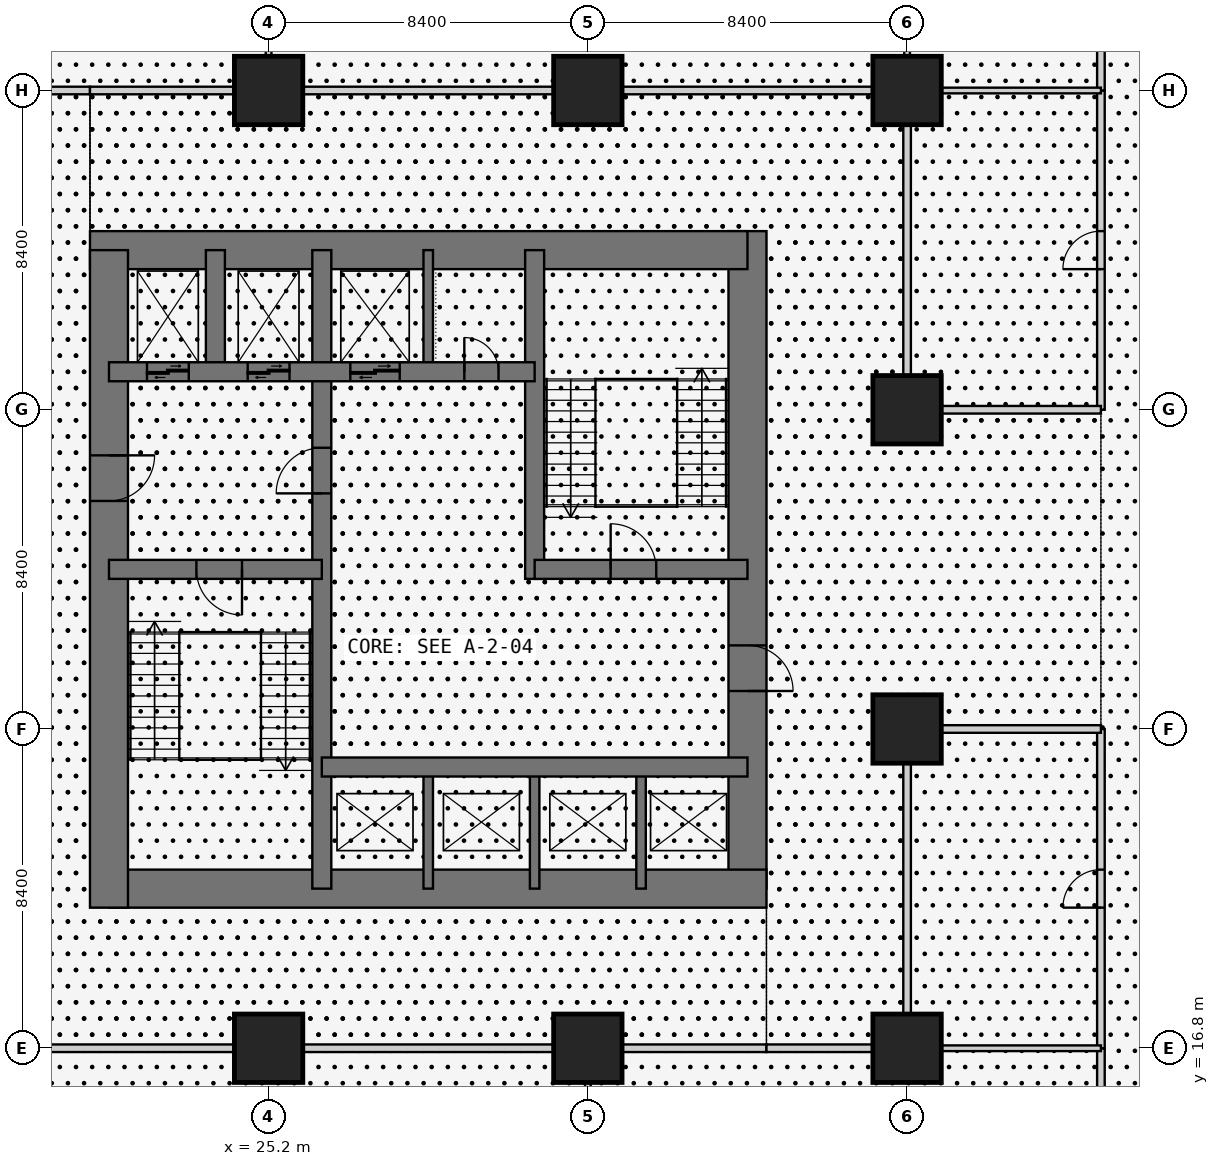
"""IFC4 building model, lengths in metres.
Left out: names, types, materials, properties, quantities, classifications, styles, units other than length and angle.
Written with IfcOpenShell. Run it as: python <this file> out.ifc"""

import sys

from ifc_helpers import new_model, si_unit, direction, frame, frame_2d, origin, origin_2d, place, context, subcontext, project, spatial, rectangle, extrude, element, fill, save


model = new_model("IFC4")
c1 = context("Model", 3, precision=1e-05, world=origin(), true_north=direction((0.0, 1.0)))
c2 = subcontext(c1, "Body", "Model", "MODEL_VIEW")
j1 = project(units=[si_unit("LENGTHUNIT", "METRE"), si_unit("PLANEANGLEUNIT", "RADIAN")], contexts=[c1])
p1 = place(None, origin())
s1 = spatial("IfcSite", under=j1, at=p1, CompositionType="ELEMENT")
p2 = place(p1, origin())
s2 = spatial("IfcBuilding", under=s1, at=p2, CompositionType="ELEMENT")
p3 = place(p2, frame((0.0, 0.0, 6.0)))
s3 = spatial("IfcBuildingStorey", under=s2, at=p3, CompositionType="ELEMENT", Elevation=6.0)
for number, where, z_axis, x_axis in (
    (1, (25.2, 16.8, 0.0), (0.0, 0.0, 1.0), (1.0, 0.0, 0.0)),
    (2, (25.2, 42.0, 0.0), (0.0, 0.0, 1.0), (1.0, 0.0, 0.0)),
    (3, (33.6, 16.8, 0.0), (0.0, 0.0, 1.0), (1.0, 0.0, 0.0)),
    (4, (33.6, 42.0, 0.0), (0.0, 0.0, 1.0), (1.0, 0.0, 0.0)),
    (5, (42.0, 16.8, 0.0), (0.0, 0.0, 1.0), (1.0, 0.0, 0.0)),
    (6, (42.0, 25.2, 0.0), (0.0, 0.0, 1.0), (1.0, 0.0, 0.0)),
    (7, (42.0, 33.6, 0.0), (0.0, 0.0, 1.0), (1.0, 0.0, 0.0)),
    (8, (42.0, 42.0, 0.0), (0.0, 0.0, 1.0), (1.0, 0.0, 0.0)),
):
    element("IfcColumn", number, at=place(p3, frame(where, z_axis=z_axis, x_axis=x_axis)), inside=s3, PredefinedType="COLUMN", context=c2, shape_type="SweptSolid", body=[
        extrude(rectangle(XDim=1.8, YDim=1.8, at=origin_2d()), origin(), (0.0, 0.0, 1.0), 4.5),
    ])
p4 = place(p3, frame((21.0, 21.0, 0.0), z_axis=(0.0, 0.0, 1.0), x_axis=(1.0, 0.0, 0.0)))
e9 = element("IfcWall", 9, at=p4, inside=s3, PredefinedType="SHEAR", context=c2, shape_type="SweptSolid", body=[
    extrude(rectangle(XDim=17.3, YDim=1.0, at=frame_2d((8.65, 0.0))), origin(), (0.0, 0.0, 1.0), 4.5),
])
p5 = place(p3, frame((37.8, 21.0, 0.0), z_axis=(0.0, 0.0, 1.0), x_axis=(0.0, 1.0, 0.0)))
e10 = element("IfcWall", 10, at=p5, inside=s3, PredefinedType="SHEAR", context=c2, shape_type="SweptSolid", body=[
    extrude(rectangle(XDim=17.3, YDim=1.0, at=frame_2d((8.65, 0.0))), origin(), (0.0, 0.0, 1.0), 4.5),
])
p6 = place(p5, frame((5.2, 0.0, 0.0)))
e11 = element("IfcOpeningElement", 11, at=p6, cuts=e10, PredefinedType="OPENING", context=c2, shape_type="SweptSolid", body=[
    extrude(rectangle(XDim=1.2, YDim=2.1, at=frame_2d((0.6, 1.05))), frame((0.0, 0.51, 0.0), z_axis=(0.0, -1.0, 0.0), x_axis=(1.0, 0.0, 0.0)), (0.0, 0.0, 1.0), 1.02),
])
p7 = place(p3, frame((37.8, 37.8, 0.0), z_axis=(0.0, 0.0, 1.0), x_axis=(-1.0, 0.0, 0.0)))
e12 = element("IfcWall", 12, at=p7, inside=s3, PredefinedType="SHEAR", context=c2, shape_type="SweptSolid", body=[
    extrude(rectangle(XDim=17.3, YDim=1.0, at=frame_2d((8.65, 0.0))), origin(), (0.0, 0.0, 1.0), 4.5),
])
p8 = place(p3, frame((21.0, 37.8, 0.0), z_axis=(0.0, 0.0, 1.0), x_axis=(0.0, -1.0, 0.0)))
e13 = element("IfcWall", 13, at=p8, inside=s3, PredefinedType="SHEAR", context=c2, shape_type="SweptSolid", body=[
    extrude(rectangle(XDim=17.3, YDim=1.0, at=frame_2d((8.65, 0.0))), origin(), (0.0, 0.0, 1.0), 4.5),
])
p9 = place(p8, frame((5.4, 0.0, 0.0)))
e14 = element("IfcOpeningElement", 14, at=p9, cuts=e13, PredefinedType="OPENING", context=c2, shape_type="SweptSolid", body=[
    extrude(rectangle(XDim=1.2, YDim=2.1, at=frame_2d((0.6, 1.05))), frame((0.0, 0.51, 0.0), z_axis=(0.0, -1.0, 0.0), x_axis=(1.0, 0.0, 0.0)), (0.0, 0.0, 1.0), 1.02),
])
p10 = place(p3, frame((26.6, 21.0, 0.0), z_axis=(0.0, 0.0, 1.0), x_axis=(0.0, 1.0, 0.0)))
e15 = element("IfcWall", 15, at=p10, inside=s3, PredefinedType="SHEAR", context=c2, shape_type="SweptSolid", body=[
    extrude(rectangle(XDim=16.8, YDim=0.5, at=frame_2d((8.4, 0.0))), origin(), (0.0, 0.0, 1.0), 4.5),
])
p11 = place(p10, frame((10.4, 0.0, 0.0)))
e16 = element("IfcOpeningElement", 16, at=p11, cuts=e15, PredefinedType="OPENING", context=c2, shape_type="SweptSolid", body=[
    extrude(rectangle(XDim=1.2, YDim=2.1, at=frame_2d((0.6, 1.05))), frame((0.0, 0.26, 0.0), z_axis=(0.0, -1.0, 0.0), x_axis=(1.0, 0.0, 0.0)), (0.0, 0.0, 1.0), 0.52),
])
p12 = place(p3, frame((21.0, 29.4, 0.0), z_axis=(0.0, 0.0, 1.0), x_axis=(1.0, 0.0, 0.0)))
e17 = element("IfcWall", 17, at=p12, inside=s3, PredefinedType="SHEAR", context=c2, shape_type="SweptSolid", body=[
    extrude(rectangle(XDim=5.6, YDim=0.5, at=frame_2d((2.8, 0.0))), origin(), (0.0, 0.0, 1.0), 4.5),
])
p13 = place(p12, frame((2.3, 0.0, 0.0)))
e18 = element("IfcOpeningElement", 18, at=p13, cuts=e17, PredefinedType="OPENING", context=c2, shape_type="SweptSolid", body=[
    extrude(rectangle(XDim=1.2, YDim=2.1, at=frame_2d((0.6, 1.05))), frame((0.0, 0.26, 0.0), z_axis=(0.0, -1.0, 0.0), x_axis=(1.0, 0.0, 0.0)), (0.0, 0.0, 1.0), 0.52),
])
p14 = place(p3, frame((21.0, 34.6, 0.0), z_axis=(0.0, 0.0, 1.0), x_axis=(1.0, 0.0, 0.0)))
e19 = element("IfcWall", 19, at=p14, inside=s3, PredefinedType="SHEAR", context=c2, shape_type="SweptSolid", body=[
    extrude(rectangle(XDim=11.2, YDim=0.5, at=frame_2d((5.6, 0.0))), origin(), (0.0, 0.0, 1.0), 4.5),
])
p15 = place(p14, frame((9.35, 0.0, 0.0)))
e20 = element("IfcOpeningElement", 20, at=p15, cuts=e19, PredefinedType="OPENING", context=c2, shape_type="SweptSolid", body=[
    extrude(rectangle(XDim=0.9, YDim=2.1, at=frame_2d((0.45, 1.05))), frame((0.0, 0.26, 0.0), z_axis=(0.0, -1.0, 0.0), x_axis=(1.0, 0.0, 0.0)), (0.0, 0.0, 1.0), 0.52),
])
p16 = place(p14, frame((1.0, 0.0, 0.0)))
e21 = element("IfcOpeningElement", 21, at=p16, cuts=e19, PredefinedType="OPENING", context=c2, shape_type="SweptSolid", body=[
    extrude(rectangle(XDim=1.1, YDim=2.1, at=frame_2d((0.55, 1.05))), frame((0.0, 0.26, 0.0), z_axis=(0.0, -1.0, 0.0), x_axis=(1.0, 0.0, 0.0)), (0.0, 0.0, 1.0), 0.52),
])
p17 = place(p14, frame((3.65, 0.0, 0.0)))
e22 = element("IfcOpeningElement", 22, at=p17, cuts=e19, PredefinedType="OPENING", context=c2, shape_type="SweptSolid", body=[
    extrude(rectangle(XDim=1.1, YDim=2.1, at=frame_2d((0.55, 1.05))), frame((0.0, 0.26, 0.0), z_axis=(0.0, -1.0, 0.0), x_axis=(1.0, 0.0, 0.0)), (0.0, 0.0, 1.0), 0.52),
])
p18 = place(p14, frame((6.35, 0.0, 0.0)))
e23 = element("IfcOpeningElement", 23, at=p18, cuts=e19, PredefinedType="OPENING", context=c2, shape_type="SweptSolid", body=[
    extrude(rectangle(XDim=1.3, YDim=2.1, at=frame_2d((0.65, 1.05))), frame((0.0, 0.26, 0.0), z_axis=(0.0, -1.0, 0.0), x_axis=(1.0, 0.0, 0.0)), (0.0, 0.0, 1.0), 0.52),
])
p19 = place(p3, frame((23.8, 34.6, 0.0), z_axis=(0.0, 0.0, 1.0), x_axis=(0.0, 1.0, 0.0)))
e24 = element("IfcWall", 24, at=p19, inside=s3, PredefinedType="SHEAR", context=c2, shape_type="SweptSolid", body=[
    extrude(rectangle(XDim=3.2, YDim=0.5, at=frame_2d((1.6, 0.0))), origin(), (0.0, 0.0, 1.0), 4.5),
])
p20 = place(p3, frame((26.6, 24.2, 0.0), z_axis=(0.0, 0.0, 1.0), x_axis=(1.0, 0.0, 0.0)))
e25 = element("IfcWall", 25, at=p20, inside=s3, PredefinedType="SHEAR", context=c2, shape_type="SweptSolid", body=[
    extrude(rectangle(XDim=11.2, YDim=0.5, at=frame_2d((5.6, 0.0))), origin(), (0.0, 0.0, 1.0), 4.5),
])
p21 = place(p3, frame((32.2, 29.15, 0.0), z_axis=(0.0, 0.0, 1.0), x_axis=(0.0, 1.0, 0.0)))
e26 = element("IfcWall", 26, at=p21, inside=s3, PredefinedType="SHEAR", context=c2, shape_type="SweptSolid", body=[
    extrude(rectangle(XDim=8.65, YDim=0.5, at=frame_2d((4.325, 0.0))), origin(), (0.0, 0.0, 1.0), 4.5),
])
p22 = place(p3, frame((32.2, 29.4, 0.0), z_axis=(0.0, 0.0, 1.0), x_axis=(1.0, 0.0, 0.0)))
e27 = element("IfcWall", 27, at=p22, inside=s3, PredefinedType="SHEAR", context=c2, shape_type="SweptSolid", body=[
    extrude(rectangle(XDim=5.6, YDim=0.5, at=frame_2d((2.8, 0.0))), origin(), (0.0, 0.0, 1.0), 4.5),
])
p23 = place(p22, frame((2.0, 0.0, 0.0)))
e28 = element("IfcOpeningElement", 28, at=p23, cuts=e27, PredefinedType="OPENING", context=c2, shape_type="SweptSolid", body=[
    extrude(rectangle(XDim=1.2, YDim=2.1, at=frame_2d((0.6, 1.05))), frame((0.0, 0.26, 0.0), z_axis=(0.0, -1.0, 0.0), x_axis=(1.0, 0.0, 0.0)), (0.0, 0.0, 1.0), 0.52),
])
for number, where, z_axis, x_axis in (
    (29, (29.4, 21.0, 0.0), (0.0, 0.0, 1.0), (0.0, 1.0, 0.0)),
    (30, (32.2, 21.0, 0.0), (0.0, 0.0, 1.0), (0.0, 1.0, 0.0)),
    (31, (35.0, 21.0, 0.0), (0.0, 0.0, 1.0), (0.0, 1.0, 0.0)),
    (32, (29.4, 34.6, 0.0), (0.0, 0.0, 1.0), (0.0, 1.0, 0.0)),
):
    element("IfcWall", number, at=place(p3, frame(where, z_axis=z_axis, x_axis=x_axis)), inside=s3, PredefinedType="SHEAR", context=c2, shape_type="SweptSolid", body=[
        extrude(rectangle(XDim=3.2, YDim=0.25, at=frame_2d((1.6, 0.0))), origin(), (0.0, 0.0, 1.0), 4.5),
    ])
p24 = place(p3, frame((47.1, 8.4, 0.0), z_axis=(0.0, 0.0, 1.0), x_axis=(0.0, 1.0, 0.0)))
e33 = element("IfcWall", 33, at=p24, inside=s3, PredefinedType="PARTITIONING", context=c2, shape_type="SweptSolid", body=[
    extrude(rectangle(XDim=8.4, YDim=0.2, at=frame_2d((4.2, 0.0))), origin(), (0.0, 0.0, 1.0), 4.3),
])
p25 = place(p24, frame((3.7, 0.0, 0.0)))
e34 = element("IfcOpeningElement", 34, at=p25, cuts=e33, PredefinedType="OPENING", context=c2, shape_type="SweptSolid", body=[
    extrude(rectangle(XDim=1.0, YDim=2.1, at=frame_2d((0.5, 1.05))), frame((0.0, 0.11, 0.0), z_axis=(0.0, -1.0, 0.0), x_axis=(1.0, 0.0, 0.0)), (0.0, 0.0, 1.0), 0.22),
])
p26 = place(p3, frame((47.1, 16.8, 0.0), z_axis=(0.0, 0.0, 1.0), x_axis=(0.0, 1.0, 0.0)))
e35 = element("IfcWall", 35, at=p26, inside=s3, PredefinedType="PARTITIONING", context=c2, shape_type="SweptSolid", body=[
    extrude(rectangle(XDim=8.4, YDim=0.2, at=frame_2d((4.2, 0.0))), origin(), (0.0, 0.0, 1.0), 4.3),
])
p27 = place(p26, frame((3.7, 0.0, 0.0)))
e36 = element("IfcOpeningElement", 36, at=p27, cuts=e35, PredefinedType="OPENING", context=c2, shape_type="SweptSolid", body=[
    extrude(rectangle(XDim=1.0, YDim=2.1, at=frame_2d((0.5, 1.05))), frame((0.0, 0.11, 0.0), z_axis=(0.0, -1.0, 0.0), x_axis=(1.0, 0.0, 0.0)), (0.0, 0.0, 1.0), 0.22),
])
p28 = place(p3, frame((47.1, 33.6, 0.0), z_axis=(0.0, 0.0, 1.0), x_axis=(0.0, 1.0, 0.0)))
e37 = element("IfcWall", 37, at=p28, inside=s3, PredefinedType="PARTITIONING", context=c2, shape_type="SweptSolid", body=[
    extrude(rectangle(XDim=8.4, YDim=0.2, at=frame_2d((4.2, 0.0))), origin(), (0.0, 0.0, 1.0), 4.3),
])
p29 = place(p28, frame((3.7, 0.0, 0.0)))
e38 = element("IfcOpeningElement", 38, at=p29, cuts=e37, PredefinedType="OPENING", context=c2, shape_type="SweptSolid", body=[
    extrude(rectangle(XDim=1.0, YDim=2.1, at=frame_2d((0.5, 1.05))), frame((0.0, 0.11, 0.0), z_axis=(0.0, -1.0, 0.0), x_axis=(1.0, 0.0, 0.0)), (0.0, 0.0, 1.0), 0.22),
])
p30 = place(p3, frame((47.1, 42.0, 0.0), z_axis=(0.0, 0.0, 1.0), x_axis=(0.0, 1.0, 0.0)))
e39 = element("IfcWall", 39, at=p30, inside=s3, PredefinedType="PARTITIONING", context=c2, shape_type="SweptSolid", body=[
    extrude(rectangle(XDim=5.1, YDim=0.2, at=frame_2d((2.55, 0.0))), origin(), (0.0, 0.0, 1.0), 4.3),
])
p31 = place(p30, frame((2.05, 0.0, 0.0)))
e40 = element("IfcOpeningElement", 40, at=p31, cuts=e39, PredefinedType="OPENING", context=c2, shape_type="SweptSolid", body=[
    extrude(rectangle(XDim=1.0, YDim=2.1, at=frame_2d((0.5, 1.05))), frame((0.0, 0.11, 0.0), z_axis=(0.0, -1.0, 0.0), x_axis=(1.0, 0.0, 0.0)), (0.0, 0.0, 1.0), 0.22),
])
p32 = place(p3, frame((24.3, 16.8, 0.0), z_axis=(0.0, 0.0, 1.0), x_axis=(-1.0, 0.0, 0.0)))
e41 = element("IfcWall", 41, at=p32, inside=s3, PredefinedType="PARTITIONING", context=c2, shape_type="SweptSolid", body=[
    extrude(rectangle(XDim=6.6, YDim=0.2, at=frame_2d((3.3, 0.0))), origin(), (0.0, 0.0, 1.0), 3.543),
])
p33 = place(p3, frame((32.7, 16.8, 0.0), z_axis=(0.0, 0.0, 1.0), x_axis=(-1.0, 0.0, 0.0)))
e42 = element("IfcWall", 42, at=p33, inside=s3, PredefinedType="PARTITIONING", context=c2, shape_type="SweptSolid", body=[
    extrude(rectangle(XDim=6.6, YDim=0.2, at=frame_2d((3.3, 0.0))), origin(), (0.0, 0.0, 1.0), 3.543),
])
p34 = place(p3, frame((38.3, 16.8, 0.0), z_axis=(0.0, 0.0, 1.0), x_axis=(-1.0, 0.0, 0.0)))
e43 = element("IfcWall", 43, at=p34, inside=s3, PredefinedType="PARTITIONING", context=c2, shape_type="SweptSolid", body=[
    extrude(rectangle(XDim=3.8, YDim=0.2, at=frame_2d((1.9, 0.0))), origin(), (0.0, 0.0, 1.0), 3.543),
])
for number, where, z_axis, x_axis in (
    (44, (17.7, 42.0, 0.0), (0.0, 0.0, 1.0), (1.0, 0.0, 0.0)),
    (45, (41.1, 16.8, 0.0), (0.0, 0.0, 1.0), (-1.0, 0.0, 0.0)),
):
    element("IfcWall", number, at=place(p3, frame(where, z_axis=z_axis, x_axis=x_axis)), inside=s3, PredefinedType="PARTITIONING", context=c2, shape_type="SweptSolid", body=[
        extrude(rectangle(XDim=2.8, YDim=0.2, at=frame_2d((1.4, 0.0))), origin(), (0.0, 0.0, 1.0), 3.543),
    ])
p35 = place(p3, frame((42.0, 24.3, 0.0), z_axis=(0.0, 0.0, 1.0), x_axis=(0.0, -1.0, 0.0)))
e46 = element("IfcWall", 46, at=p35, inside=s3, PredefinedType="PARTITIONING", context=c2, shape_type="SweptSolid", body=[
    extrude(rectangle(XDim=6.6, YDim=0.2, at=frame_2d((3.3, 0.0))), origin(), (0.0, 0.0, 1.0), 3.543),
])
p36 = place(p3, frame((47.1, 25.2, 0.0), z_axis=(0.0, 0.0, 1.0), x_axis=(-1.0, 0.0, 0.0)))
e47 = element("IfcWall", 47, at=p36, inside=s3, PredefinedType="PARTITIONING", context=c2, shape_type="SweptSolid", body=[
    extrude(rectangle(XDim=4.2, YDim=0.2, at=frame_2d((2.1, 0.0))), origin(), (0.0, 0.0, 1.0), 3.543),
])
p37 = place(p3, frame((42.0, 41.1, 0.0), z_axis=(0.0, 0.0, 1.0), x_axis=(0.0, -1.0, 0.0)))
e48 = element("IfcWall", 48, at=p37, inside=s3, PredefinedType="PARTITIONING", context=c2, shape_type="SweptSolid", body=[
    extrude(rectangle(XDim=6.6, YDim=0.2, at=frame_2d((3.3, 0.0))), origin(), (0.0, 0.0, 1.0), 3.543),
])
p38 = place(p3, frame((42.9, 33.6, 0.0), z_axis=(0.0, 0.0, 1.0), x_axis=(1.0, 0.0, 0.0)))
e49 = element("IfcWall", 49, at=p38, inside=s3, PredefinedType="PARTITIONING", context=c2, shape_type="SweptSolid", body=[
    extrude(rectangle(XDim=4.2, YDim=0.2, at=frame_2d((2.1, 0.0))), origin(), (0.0, 0.0, 1.0), 3.543),
])
p39 = place(p3, frame((20.5, 42.0, 0.0), z_axis=(0.0, 0.0, 1.0), x_axis=(1.0, 0.0, 0.0)))
e50 = element("IfcWall", 50, at=p39, inside=s3, PredefinedType="PARTITIONING", context=c2, shape_type="SweptSolid", body=[
    extrude(rectangle(XDim=3.8, YDim=0.2, at=frame_2d((1.9, 0.0))), origin(), (0.0, 0.0, 1.0), 3.543),
])
p40 = place(p3, frame((26.1, 42.0, 0.0), z_axis=(0.0, 0.0, 1.0), x_axis=(1.0, 0.0, 0.0)))
e51 = element("IfcWall", 51, at=p40, inside=s3, PredefinedType="PARTITIONING", context=c2, shape_type="SweptSolid", body=[
    extrude(rectangle(XDim=6.6, YDim=0.2, at=frame_2d((3.3, 0.0))), origin(), (0.0, 0.0, 1.0), 3.543),
])
p41 = place(p3, frame((34.5, 42.0, 0.0), z_axis=(0.0, 0.0, 1.0), x_axis=(1.0, 0.0, 0.0)))
e52 = element("IfcWall", 52, at=p41, inside=s3, PredefinedType="PARTITIONING", context=c2, shape_type="SweptSolid", body=[
    extrude(rectangle(XDim=6.6, YDim=0.2, at=frame_2d((3.3, 0.0))), origin(), (0.0, 0.0, 1.0), 3.543),
])
p42 = place(p3, frame((33.6, 15.9, 0.0), z_axis=(0.0, 0.0, 1.0), x_axis=(0.0, -1.0, 0.0)))
e53 = element("IfcWall", 53, at=p42, inside=s3, PredefinedType="PARTITIONING", context=c2, shape_type="SweptSolid", body=[
    extrude(rectangle(XDim=6.6, YDim=0.15, at=frame_2d((3.3, 0.0))), origin(), (0.0, 0.0, 1.0), 3.543),
])
for number, where, z_axis, x_axis in (
    (54, (42.9, 16.8, 0.0), (0.0, 0.0, 1.0), (1.0, 0.0, 0.0)),
    (55, (42.9, 42.0, 0.0), (0.0, 0.0, 1.0), (1.0, 0.0, 0.0)),
    (56, (25.2, 47.1, 0.0), (0.0, 0.0, 1.0), (0.0, -1.0, 0.0)),
    (57, (42.0, 47.1, 0.0), (0.0, 0.0, 1.0), (0.0, -1.0, 0.0)),
):
    element("IfcWall", number, at=place(p3, frame(where, z_axis=z_axis, x_axis=x_axis)), inside=s3, PredefinedType="PARTITIONING", context=c2, shape_type="SweptSolid", body=[
        extrude(rectangle(XDim=4.2, YDim=0.15, at=frame_2d((2.1, 0.0))), origin(), (0.0, 0.0, 1.0), 3.543),
    ])
p43 = place(p27, origin())
e58 = element("IfcDoor", 58, at=p43, inside=s3, OperationType="SINGLE_SWING_LEFT", PredefinedType="DOOR", context=c2, shape_type="SweptSolid", body=[
    extrude(rectangle(XDim=1.0, YDim=2.1, at=frame_2d((0.5, 1.05))), frame((0.0, 0.025, 0.0), z_axis=(0.0, -1.0, 0.0), x_axis=(1.0, 0.0, 0.0)), (0.0, 0.0, 1.0), 0.05),
])
fill(e36, e58)
p44 = place(p29, origin())
e59 = element("IfcDoor", 59, at=p44, inside=s3, OperationType="SINGLE_SWING_LEFT", PredefinedType="DOOR", context=c2, shape_type="SweptSolid", body=[
    extrude(rectangle(XDim=1.0, YDim=2.1, at=frame_2d((0.5, 1.05))), frame((0.0, 0.025, 0.0), z_axis=(0.0, -1.0, 0.0), x_axis=(1.0, 0.0, 0.0)), (0.0, 0.0, 1.0), 0.05),
])
fill(e38, e59)
p45 = place(p9, origin())
e60 = element("IfcDoor", 60, at=p45, inside=s3, OperationType="SINGLE_SWING_LEFT", PredefinedType="DOOR", context=c2, shape_type="SweptSolid", body=[
    extrude(rectangle(XDim=1.2, YDim=2.1, at=frame_2d((0.6, 1.05))), frame((0.0, 0.025, 0.0), z_axis=(0.0, -1.0, 0.0), x_axis=(1.0, 0.0, 0.0)), (0.0, 0.0, 1.0), 0.05),
])
fill(e14, e60)
p46 = place(p13, frame((1.2, 0.0, 0.0), z_axis=(0.0, 0.0, 1.0), x_axis=(-1.0, 0.0, 0.0)))
e61 = element("IfcDoor", 61, at=p46, inside=s3, OperationType="SINGLE_SWING_LEFT", PredefinedType="DOOR", context=c2, shape_type="SweptSolid", body=[
    extrude(rectangle(XDim=1.2, YDim=2.1, at=frame_2d((0.6, 1.05))), frame((0.0, 0.025, 0.0), z_axis=(0.0, -1.0, 0.0), x_axis=(1.0, 0.0, 0.0)), (0.0, 0.0, 1.0), 0.05),
])
fill(e18, e61)
p47 = place(p11, origin())
e62 = element("IfcDoor", 62, at=p47, inside=s3, OperationType="SINGLE_SWING_LEFT", PredefinedType="DOOR", context=c2, shape_type="SweptSolid", body=[
    extrude(rectangle(XDim=1.2, YDim=2.1, at=frame_2d((0.6, 1.05))), frame((0.0, 0.025, 0.0), z_axis=(0.0, -1.0, 0.0), x_axis=(1.0, 0.0, 0.0)), (0.0, 0.0, 1.0), 0.05),
])
fill(e16, e62)
p48 = place(p6, frame((1.2, 0.0, 0.0), z_axis=(0.0, 0.0, 1.0), x_axis=(-1.0, 0.0, 0.0)))
e63 = element("IfcDoor", 63, at=p48, inside=s3, OperationType="SINGLE_SWING_RIGHT", PredefinedType="DOOR", context=c2, shape_type="SweptSolid", body=[
    extrude(rectangle(XDim=1.2, YDim=2.1, at=frame_2d((0.6, 1.05))), frame((0.0, 0.025, 0.0), z_axis=(0.0, -1.0, 0.0), x_axis=(1.0, 0.0, 0.0)), (0.0, 0.0, 1.0), 0.05),
])
fill(e11, e63)
p49 = place(p23, origin())
e64 = element("IfcDoor", 64, at=p49, inside=s3, OperationType="SINGLE_SWING_LEFT", PredefinedType="DOOR", context=c2, shape_type="SweptSolid", body=[
    extrude(rectangle(XDim=1.2, YDim=2.1, at=frame_2d((0.6, 1.05))), frame((0.0, 0.025, 0.0), z_axis=(0.0, -1.0, 0.0), x_axis=(1.0, 0.0, 0.0)), (0.0, 0.0, 1.0), 0.05),
])
fill(e28, e64)
p50 = place(p15, origin())
e65 = element("IfcDoor", 65, at=p50, inside=s3, OperationType="SINGLE_SWING_LEFT", PredefinedType="DOOR", context=c2, shape_type="SweptSolid", body=[
    extrude(rectangle(XDim=0.9, YDim=2.1, at=frame_2d((0.45, 1.05))), frame((0.0, 0.025, 0.0), z_axis=(0.0, -1.0, 0.0), x_axis=(1.0, 0.0, 0.0)), (0.0, 0.0, 1.0), 0.05),
])
fill(e20, e65)
p51 = place(p16, origin())
e66 = element("IfcDoor", 66, at=p51, inside=s3, OperationType="DOUBLE_DOOR_SLIDING", PredefinedType="DOOR", context=c2, shape_type="SweptSolid", body=[
    extrude(rectangle(XDim=1.1, YDim=2.1, at=frame_2d((0.55, 1.05))), frame((0.0, 0.025, 0.0), z_axis=(0.0, -1.0, 0.0), x_axis=(1.0, 0.0, 0.0)), (0.0, 0.0, 1.0), 0.05),
])
fill(e21, e66)
p52 = place(p17, origin())
e67 = element("IfcDoor", 67, at=p52, inside=s3, OperationType="DOUBLE_DOOR_SLIDING", PredefinedType="DOOR", context=c2, shape_type="SweptSolid", body=[
    extrude(rectangle(XDim=1.1, YDim=2.1, at=frame_2d((0.55, 1.05))), frame((0.0, 0.025, 0.0), z_axis=(0.0, -1.0, 0.0), x_axis=(1.0, 0.0, 0.0)), (0.0, 0.0, 1.0), 0.05),
])
fill(e22, e67)
p53 = place(p18, origin())
e68 = element("IfcDoor", 68, at=p53, inside=s3, OperationType="DOUBLE_DOOR_SLIDING", PredefinedType="DOOR", context=c2, shape_type="SweptSolid", body=[
    extrude(rectangle(XDim=1.3, YDim=2.1, at=frame_2d((0.65, 1.05))), frame((0.0, 0.025, 0.0), z_axis=(0.0, -1.0, 0.0), x_axis=(1.0, 0.0, 0.0)), (0.0, 0.0, 1.0), 0.05),
])
fill(e23, e68)
save(model, sys.argv[1])
